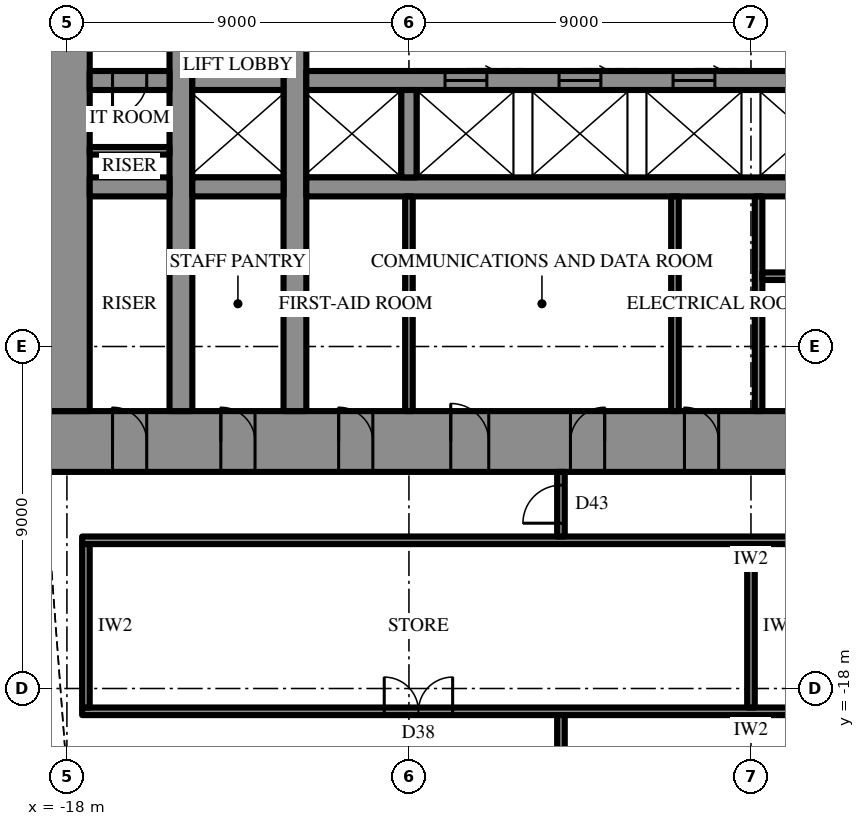
"""IFC4 building model, lengths in metres.
Left out: names, types, materials, properties, quantities, classifications, styles, units other than length and angle.
Written with IfcOpenShell. Run it as: python <this file> out.ifc"""

import sys

from ifc_helpers import new_model, si_unit, direction, frame, frame_2d, origin, place, context, subcontext, project, spatial, rectangle, extrude, element, fill, save


model = new_model("IFC4")
c1 = context("Model", 3, precision=1e-05, world=origin(), true_north=direction((0.0, 1.0)))
c2 = subcontext(c1, "Body", "Model", "MODEL_VIEW")
j1 = project(units=[si_unit("LENGTHUNIT", "METRE"), si_unit("PLANEANGLEUNIT", "RADIAN")], contexts=[c1])
p1 = place(None, origin())
s1 = spatial("IfcSite", under=j1, at=p1, CompositionType="ELEMENT")
p2 = place(p1, origin())
s2 = spatial("IfcBuilding", under=s1, at=p2, CompositionType="ELEMENT")
p3 = place(p2, frame((0.0, 0.0, 178.3)))
s3 = spatial("IfcBuildingStorey", under=s2, at=p3, CompositionType="ELEMENT", Elevation=178.3)
p4 = place(p3, frame((18.6, -11.5, 0.0), z_axis=(0.0, 0.0, 1.0), x_axis=(-1.0, 0.0, 0.0)))
e1 = element("IfcWall", 1, at=p4, inside=s3, PredefinedType="SHEAR", context=c2, shape_type="SweptSolid", body=[
    extrude(rectangle(XDim=37.2, YDim=1.6, at=frame_2d((18.6, 0.0))), origin(), (0.0, 0.0, 1.0), 4.2),
])
p5 = place(p4, frame((19.45, 0.0, 0.0)))
e2 = element("IfcOpeningElement", 2, at=p5, cuts=e1, PredefinedType="OPENING", context=c2, shape_type="SweptSolid", body=[
    extrude(rectangle(XDim=0.9, YDim=2.2, at=frame_2d((0.45, 1.1))), frame((0.0, 0.81, 0.0), z_axis=(0.0, -1.0, 0.0), x_axis=(1.0, 0.0, 0.0)), (0.0, 0.0, 1.0), 1.62),
])
p6 = place(p4, frame((22.45, 0.0, 0.0)))
e3 = element("IfcOpeningElement", 3, at=p6, cuts=e1, PredefinedType="OPENING", context=c2, shape_type="SweptSolid", body=[
    extrude(rectangle(XDim=0.9, YDim=2.2, at=frame_2d((0.45, 1.1))), frame((0.0, 0.81, 0.0), z_axis=(0.0, -1.0, 0.0), x_axis=(1.0, 0.0, 0.0)), (0.0, 0.0, 1.0), 1.62),
])
p7 = place(p4, frame((25.5, 0.0, 0.0)))
e4 = element("IfcOpeningElement", 4, at=p7, cuts=e1, PredefinedType="OPENING", context=c2, shape_type="SweptSolid", body=[
    extrude(rectangle(XDim=1.0, YDim=2.2, at=frame_2d((0.5, 1.1))), frame((0.0, 0.81, 0.0), z_axis=(0.0, -1.0, 0.0), x_axis=(1.0, 0.0, 0.0)), (0.0, 0.0, 1.0), 1.62),
])
p8 = place(p4, frame((1.8, 0.0, 0.0)))
e5 = element("IfcOpeningElement", 5, at=p8, cuts=e1, PredefinedType="OPENING", context=c2, shape_type="SweptSolid", body=[
    extrude(rectangle(XDim=0.9, YDim=2.2, at=frame_2d((0.45, 1.1))), frame((0.0, 0.81, 0.0), z_axis=(0.0, -1.0, 0.0), x_axis=(1.0, 0.0, 0.0)), (0.0, 0.0, 1.0), 1.62),
])
p9 = place(p4, frame((4.65, 0.0, 0.0)))
e6 = element("IfcOpeningElement", 6, at=p9, cuts=e1, PredefinedType="OPENING", context=c2, shape_type="SweptSolid", body=[
    extrude(rectangle(XDim=0.9, YDim=2.2, at=frame_2d((0.45, 1.1))), frame((0.0, 0.81, 0.0), z_axis=(0.0, -1.0, 0.0), x_axis=(1.0, 0.0, 0.0)), (0.0, 0.0, 1.0), 1.62),
])
p10 = place(p4, frame((7.75, 0.0, 0.0)))
e7 = element("IfcOpeningElement", 7, at=p10, cuts=e1, PredefinedType="OPENING", context=c2, shape_type="SweptSolid", body=[
    extrude(rectangle(XDim=0.9, YDim=2.2, at=frame_2d((0.45, 1.1))), frame((0.0, 0.81, 0.0), z_axis=(0.0, -1.0, 0.0), x_axis=(1.0, 0.0, 0.0)), (0.0, 0.0, 1.0), 1.62),
])
p11 = place(p4, frame((28.55, 0.0, 0.0)))
e8 = element("IfcOpeningElement", 8, at=p11, cuts=e1, PredefinedType="OPENING", context=c2, shape_type="SweptSolid", body=[
    extrude(rectangle(XDim=0.9, YDim=2.2, at=frame_2d((0.45, 1.1))), frame((0.0, 0.81, 0.0), z_axis=(0.0, -1.0, 0.0), x_axis=(1.0, 0.0, 0.0)), (0.0, 0.0, 1.0), 1.62),
])
p12 = place(p4, frame((31.65, 0.0, 0.0)))
e9 = element("IfcOpeningElement", 9, at=p12, cuts=e1, PredefinedType="OPENING", context=c2, shape_type="SweptSolid", body=[
    extrude(rectangle(XDim=0.9, YDim=2.2, at=frame_2d((0.45, 1.1))), frame((0.0, 0.81, 0.0), z_axis=(0.0, -1.0, 0.0), x_axis=(1.0, 0.0, 0.0)), (0.0, 0.0, 1.0), 1.62),
])
p13 = place(p4, frame((34.5, 0.0, 0.0)))
e10 = element("IfcOpeningElement", 10, at=p13, cuts=e1, PredefinedType="OPENING", context=c2, shape_type="SweptSolid", body=[
    extrude(rectangle(XDim=0.9, YDim=2.2, at=frame_2d((0.45, 1.1))), frame((0.0, 0.81, 0.0), z_axis=(0.0, -1.0, 0.0), x_axis=(1.0, 0.0, 0.0)), (0.0, 0.0, 1.0), 1.62),
])
p14 = place(p3, frame((-18.0, 10.7, 0.0), z_axis=(0.0, 0.0, 1.0), x_axis=(0.0, -1.0, 0.0)))
e11 = element("IfcWall", 11, at=p14, inside=s3, PredefinedType="SHEAR", context=c2, shape_type="SweptSolid", body=[
    extrude(rectangle(XDim=21.4, YDim=1.2, at=frame_2d((10.7, 0.0))), origin(), (0.0, 0.0, 1.0), 4.2),
])
p15 = place(p14, frame((9.8, 0.0, 0.0)))
e12 = element("IfcOpeningElement", 12, at=p15, cuts=e11, PredefinedType="OPENING", context=c2, shape_type="SweptSolid", body=[
    extrude(rectangle(XDim=1.8, YDim=2.4, at=frame_2d((0.9, 1.2))), frame((0.0, 0.61, 0.0), z_axis=(0.0, -1.0, 0.0), x_axis=(1.0, 0.0, 0.0)), (0.0, 0.0, 1.0), 1.22),
])
p16 = place(p3, frame((-12.0, -10.7, 0.0), z_axis=(0.0, 0.0, 1.0), x_axis=(0.0, 1.0, 0.0)))
e13 = element("IfcWall", 13, at=p16, inside=s3, PredefinedType="SHEAR", context=c2, shape_type="SweptSolid", body=[
    extrude(rectangle(XDim=21.4, YDim=0.6, at=frame_2d((10.7, 0.0))), origin(), (0.0, 0.0, 1.0), 4.2),
])
p17 = place(p16, frame((9.8, 0.0, 0.0)))
e14 = element("IfcOpeningElement", 14, at=p17, cuts=e13, PredefinedType="OPENING", context=c2, shape_type="SweptSolid", body=[
    extrude(rectangle(XDim=1.8, YDim=2.4, at=frame_2d((0.9, 1.2))), frame((0.0, 0.31, 0.0), z_axis=(0.0, -1.0, 0.0), x_axis=(1.0, 0.0, 0.0)), (0.0, 0.0, 1.0), 0.62),
])
p18 = place(p3, frame((-15.0, -10.7, 0.0), z_axis=(0.0, 0.0, 1.0), x_axis=(0.0, 1.0, 0.0)))
e15 = element("IfcWall", 15, at=p18, inside=s3, PredefinedType="SHEAR", context=c2, shape_type="SweptSolid", body=[
    extrude(rectangle(XDim=21.4, YDim=0.6, at=frame_2d((10.7, 0.0))), origin(), (0.0, 0.0, 1.0), 4.2),
])
p19 = place(p18, frame((9.8, 0.0, 0.0)))
e16 = element("IfcOpeningElement", 16, at=p19, cuts=e15, PredefinedType="OPENING", context=c2, shape_type="SweptSolid", body=[
    extrude(rectangle(XDim=1.8, YDim=2.4, at=frame_2d((0.9, 1.2))), frame((0.0, 0.31, 0.0), z_axis=(0.0, -1.0, 0.0), x_axis=(1.0, 0.0, 0.0)), (0.0, 0.0, 1.0), 0.62),
])
p20 = place(p3, frame((3.2, -2.0, 0.0), z_axis=(0.0, 0.0, 1.0), x_axis=(-1.0, 0.0, 0.0)))
e17 = element("IfcWall", 17, at=p20, inside=s3, PredefinedType="SHEAR", context=c2, shape_type="SweptSolid", body=[
    extrude(rectangle(XDim=14.9, YDim=0.5, at=frame_2d((7.45, 0.0))), origin(), (0.0, 0.0, 1.0), 4.2),
])
p21 = place(p20, frame((1.15, 0.0, 0.0)))
e18 = element("IfcOpeningElement", 18, at=p21, cuts=e17, PredefinedType="OPENING", context=c2, shape_type="SweptSolid", body=[
    extrude(rectangle(XDim=1.1, YDim=2.2, at=frame_2d((0.55, 1.1))), frame((0.0, 0.26, 0.0), z_axis=(0.0, -1.0, 0.0), x_axis=(1.0, 0.0, 0.0)), (0.0, 0.0, 1.0), 0.52),
])
p22 = place(p20, frame((4.15, 0.0, 0.0)))
e19 = element("IfcOpeningElement", 19, at=p22, cuts=e17, PredefinedType="OPENING", context=c2, shape_type="SweptSolid", body=[
    extrude(rectangle(XDim=1.1, YDim=2.2, at=frame_2d((0.55, 1.1))), frame((0.0, 0.26, 0.0), z_axis=(0.0, -1.0, 0.0), x_axis=(1.0, 0.0, 0.0)), (0.0, 0.0, 1.0), 0.52),
])
p23 = place(p20, frame((7.15, 0.0, 0.0)))
e20 = element("IfcOpeningElement", 20, at=p23, cuts=e17, PredefinedType="OPENING", context=c2, shape_type="SweptSolid", body=[
    extrude(rectangle(XDim=1.1, YDim=2.2, at=frame_2d((0.55, 1.1))), frame((0.0, 0.26, 0.0), z_axis=(0.0, -1.0, 0.0), x_axis=(1.0, 0.0, 0.0)), (0.0, 0.0, 1.0), 0.52),
])
p24 = place(p20, frame((10.15, 0.0, 0.0)))
e21 = element("IfcOpeningElement", 21, at=p24, cuts=e17, PredefinedType="OPENING", context=c2, shape_type="SweptSolid", body=[
    extrude(rectangle(XDim=1.1, YDim=2.2, at=frame_2d((0.55, 1.1))), frame((0.0, 0.26, 0.0), z_axis=(0.0, -1.0, 0.0), x_axis=(1.0, 0.0, 0.0)), (0.0, 0.0, 1.0), 0.52),
])
p25 = place(p3, frame((-12.3, -2.0, 0.0), z_axis=(0.0, 0.0, 1.0), x_axis=(-1.0, 0.0, 0.0)))
e22 = element("IfcWall", 22, at=p25, inside=s3, PredefinedType="SHEAR", context=c2, shape_type="SweptSolid", body=[
    extrude(rectangle(XDim=2.4, YDim=0.5, at=frame_2d((1.2, 0.0))), origin(), (0.0, 0.0, 1.0), 4.2),
])
p26 = place(p3, frame((-15.3, -2.0, 0.0), z_axis=(0.0, 0.0, 1.0), x_axis=(-1.0, 0.0, 0.0)))
e23 = element("IfcWall", 23, at=p26, inside=s3, PredefinedType="SHEAR", context=c2, shape_type="SweptSolid", body=[
    extrude(rectangle(XDim=2.1, YDim=0.5, at=frame_2d((1.05, 0.0))), origin(), (0.0, 0.0, 1.0), 4.2),
])
p27 = place(p26, frame((0.6, 0.0, 0.0)))
e24 = element("IfcOpeningElement", 24, at=p27, cuts=e23, PredefinedType="OPENING", context=c2, shape_type="SweptSolid", body=[
    extrude(rectangle(XDim=0.9, YDim=2.2, at=frame_2d((0.45, 1.1))), frame((0.0, 0.26, 0.0), z_axis=(0.0, -1.0, 0.0), x_axis=(1.0, 0.0, 0.0)), (0.0, 0.0, 1.0), 0.52),
])
p28 = place(p3, frame((11.7, -4.8, 0.0), z_axis=(0.0, 0.0, 1.0), x_axis=(-1.0, 0.0, 0.0)))
e25 = element("IfcWall", 25, at=p28, inside=s3, PredefinedType="SHEAR", context=c2, shape_type="SweptSolid", body=[
    extrude(rectangle(XDim=23.4, YDim=0.5, at=frame_2d((11.7, 0.0))), origin(), (0.0, 0.0, 1.0), 4.2),
])
p29 = place(p28, frame((6.6, 0.0, 0.0)))
e26 = element("IfcOpeningElement", 26, at=p29, cuts=e25, PredefinedType="OPENING", context=c2, shape_type="SweptSolid", body=[
    extrude(rectangle(XDim=1.2, YDim=2.2, at=frame_2d((0.6, 1.1))), frame((0.0, 0.26, 0.0), z_axis=(0.0, -1.0, 0.0), x_axis=(1.0, 0.0, 0.0)), (0.0, 0.0, 1.0), 0.52),
])
p30 = place(p28, frame((3.6, 0.0, 0.0)))
e27 = element("IfcOpeningElement", 27, at=p30, cuts=e25, PredefinedType="OPENING", context=c2, shape_type="SweptSolid", body=[
    extrude(rectangle(XDim=1.2, YDim=2.2, at=frame_2d((0.6, 1.1))), frame((0.0, 0.26, 0.0), z_axis=(0.0, -1.0, 0.0), x_axis=(1.0, 0.0, 0.0)), (0.0, 0.0, 1.0), 0.52),
])
p31 = place(p3, frame((-12.3, -4.8, 0.0), z_axis=(0.0, 0.0, 1.0), x_axis=(-1.0, 0.0, 0.0)))
e28 = element("IfcWall", 28, at=p31, inside=s3, PredefinedType="SHEAR", context=c2, shape_type="SweptSolid", body=[
    extrude(rectangle(XDim=2.4, YDim=0.5, at=frame_2d((1.2, 0.0))), origin(), (0.0, 0.0, 1.0), 4.2),
])
p32 = place(p3, frame((-15.3, -4.8, 0.0), z_axis=(0.0, 0.0, 1.0), x_axis=(-1.0, 0.0, 0.0)))
e29 = element("IfcWall", 29, at=p32, inside=s3, PredefinedType="SHEAR", context=c2, shape_type="SweptSolid", body=[
    extrude(rectangle(XDim=2.1, YDim=0.5, at=frame_2d((1.05, 0.0))), origin(), (0.0, 0.0, 1.0), 4.2),
])
p33 = place(p3, frame((-9.0, -2.25, 0.0), z_axis=(0.0, 0.0, 1.0), x_axis=(0.0, -1.0, 0.0)))
e30 = element("IfcWall", 30, at=p33, inside=s3, PredefinedType="SHEAR", context=c2, shape_type="SweptSolid", body=[
    extrude(rectangle(XDim=2.3, YDim=0.4, at=frame_2d((1.15, 0.0))), origin(), (0.0, 0.0, 1.0), 4.2),
])
p34 = place(p3, frame((0.2, -5.05, 0.0), z_axis=(0.0, 0.0, 1.0), x_axis=(0.0, -1.0, 0.0)))
e31 = element("IfcWall", 31, at=p34, inside=s3, PredefinedType="SHEAR", context=c2, shape_type="SweptSolid", body=[
    extrude(rectangle(XDim=5.65, YDim=0.2, at=frame_2d((2.825, 0.0))), origin(), (0.0, 0.0, 1.0), 4.2),
])
p35 = place(p3, frame((8.9, -7.15, 0.0), z_axis=(0.0, 0.0, 1.0), x_axis=(-1.0, 0.0, 0.0)))
e32 = element("IfcWall", 32, at=p35, inside=s3, PredefinedType="SHEAR", context=c2, shape_type="SweptSolid", body=[
    extrude(rectangle(XDim=8.6, YDim=0.2, at=frame_2d((4.3, 0.0))), origin(), (0.0, 0.0, 1.0), 4.2),
])
p36 = place(p35, frame((0.3, 0.0, 0.0)))
e33 = element("IfcOpeningElement", 33, at=p36, cuts=e32, PredefinedType="OPENING", context=c2, shape_type="SweptSolid", body=[
    extrude(rectangle(XDim=1.0, YDim=2.2, at=frame_2d((0.5, 1.1))), frame((0.0, 0.11, 0.0), z_axis=(0.0, -1.0, 0.0), x_axis=(1.0, 0.0, 0.0)), (0.0, 0.0, 1.0), 0.22),
])
for number, where, z_axis, x_axis in (
    (34, (-9.0, -5.05, 0.0), (0.0, 0.0, 1.0), (0.0, -1.0, 0.0)),
    (35, (-2.0, -5.05, 0.0), (0.0, 0.0, 1.0), (0.0, -1.0, 0.0)),
):
    element("IfcWall", number, at=place(p3, frame(where, z_axis=z_axis, x_axis=x_axis)), inside=s3, PredefinedType="PARTITIONING", context=c2, shape_type="SweptSolid", body=[
        extrude(rectangle(XDim=5.65, YDim=0.2, at=frame_2d((2.825, 0.0))), origin(), (0.0, 0.0, 1.0), 4.0),
    ])
p37 = place(p3, frame((-15.3, -3.85, 0.0), z_axis=(0.0, 0.0, 1.0), x_axis=(-1.0, 0.0, 0.0)))
e36 = element("IfcWall", 36, at=p37, inside=s3, PredefinedType="PARTITIONING", context=c2, shape_type="SweptSolid", body=[
    extrude(rectangle(XDim=2.1, YDim=0.2, at=frame_2d((1.05, 0.0))), origin(), (0.0, 0.0, 1.0), 4.0),
])
p38 = place(p3, frame((17.6, -14.1, 0.0), z_axis=(0.0, 0.0, 1.0), x_axis=(-1.0, 0.0, 0.0)))
e37 = element("IfcWall", 37, at=p38, inside=s3, PredefinedType="PARTITIONING", context=c2, shape_type="SweptSolid", body=[
    extrude(rectangle(XDim=35.2, YDim=0.2, at=frame_2d((17.6, 0.0))), origin(), (0.0, 0.0, 1.0), 4.0),
])
p39 = place(p3, frame((17.6, -18.6, 0.0), z_axis=(0.0, 0.0, 1.0), x_axis=(-1.0, 0.0, 0.0)))
e38 = element("IfcWall", 38, at=p39, inside=s3, PredefinedType="PARTITIONING", context=c2, shape_type="SweptSolid", body=[
    extrude(rectangle(XDim=35.2, YDim=0.2, at=frame_2d((17.6, 0.0))), origin(), (0.0, 0.0, 1.0), 4.0),
])
p40 = place(p39, frame((7.95, 0.0, 0.0)))
e39 = element("IfcOpeningElement", 39, at=p40, cuts=e38, PredefinedType="OPENING", context=c2, shape_type="SweptSolid", body=[
    extrude(rectangle(XDim=1.8, YDim=2.4, at=frame_2d((0.9, 1.2))), frame((0.0, 0.11, 0.0), z_axis=(0.0, -1.0, 0.0), x_axis=(1.0, 0.0, 0.0)), (0.0, 0.0, 1.0), 0.22),
])
p41 = place(p39, frame((25.45, 0.0, 0.0)))
e40 = element("IfcOpeningElement", 40, at=p41, cuts=e38, PredefinedType="OPENING", context=c2, shape_type="SweptSolid", body=[
    extrude(rectangle(XDim=1.8, YDim=2.4, at=frame_2d((0.9, 1.2))), frame((0.0, 0.11, 0.0), z_axis=(0.0, -1.0, 0.0), x_axis=(1.0, 0.0, 0.0)), (0.0, 0.0, 1.0), 0.22),
])
p42 = place(p3, frame((0.0, -14.2, 0.0), z_axis=(0.0, 0.0, 1.0), x_axis=(0.0, -1.0, 0.0)))
e41 = element("IfcWall", 41, at=p42, inside=s3, PredefinedType="PARTITIONING", context=c2, shape_type="SweptSolid", body=[
    extrude(rectangle(XDim=4.3, YDim=0.2, at=frame_2d((2.15, 0.0))), origin(), (0.0, 0.0, 1.0), 2.992),
])
p43 = place(p3, frame((-17.5, -14.2, 0.0), z_axis=(0.0, 0.0, 1.0), x_axis=(0.0, -1.0, 0.0)))
e42 = element("IfcWall", 42, at=p43, inside=s3, PredefinedType="PARTITIONING", context=c2, shape_type="SweptSolid", body=[
    extrude(rectangle(XDim=4.3, YDim=0.2, at=frame_2d((2.15, 0.0))), origin(), (0.0, 0.0, 1.0), 4.0),
])
p44 = place(p3, frame((-5.0, -12.3, 0.0), z_axis=(0.0, 0.0, 1.0), x_axis=(0.0, -1.0, 0.0)))
e43 = element("IfcWall", 43, at=p44, inside=s3, PredefinedType="PARTITIONING", context=c2, shape_type="SweptSolid", body=[
    extrude(rectangle(XDim=1.7, YDim=0.2, at=frame_2d((0.85, 0.0))), origin(), (0.0, 0.0, 1.0), 2.992),
])
p45 = place(p44, frame((0.35, 0.0, 0.0)))
e44 = element("IfcOpeningElement", 44, at=p45, cuts=e43, PredefinedType="OPENING", context=c2, shape_type="SweptSolid", body=[
    extrude(rectangle(XDim=1.0, YDim=2.2, at=frame_2d((0.5, 1.1))), frame((0.0, 0.11, 0.0), z_axis=(0.0, -1.0, 0.0), x_axis=(1.0, 0.0, 0.0)), (0.0, 0.0, 1.0), 0.22),
])
p46 = place(p3, frame((-5.0, -18.7, 0.0), z_axis=(0.0, 0.0, 1.0), x_axis=(0.0, -1.0, 0.0)))
e45 = element("IfcWall", 45, at=p46, inside=s3, PredefinedType="PARTITIONING", context=c2, shape_type="SweptSolid", body=[
    extrude(rectangle(XDim=6.2, YDim=0.2, at=frame_2d((3.1, 0.0))), origin(), (0.0, 0.0, 1.0), 2.992),
])
p47 = place(p5, frame((0.9, 0.0, 0.0), z_axis=(0.0, 0.0, 1.0), x_axis=(-1.0, 0.0, 0.0)))
e46 = element("IfcDoor", 46, at=p47, inside=s3, OperationType="SINGLE_SWING_RIGHT", PredefinedType="DOOR", context=c2, shape_type="SweptSolid", body=[
    extrude(rectangle(XDim=0.9, YDim=2.2, at=frame_2d((0.45, 1.1))), frame((0.0, 0.025, 0.0), z_axis=(0.0, -1.0, 0.0), x_axis=(1.0, 0.0, 0.0)), (0.0, 0.0, 1.0), 0.05),
])
fill(e2, e46)
p48 = place(p6, frame((0.9, 0.0, 0.0), z_axis=(0.0, 0.0, 1.0), x_axis=(-1.0, 0.0, 0.0)))
e47 = element("IfcDoor", 47, at=p48, inside=s3, OperationType="SINGLE_SWING_LEFT", PredefinedType="DOOR", context=c2, shape_type="SweptSolid", body=[
    extrude(rectangle(XDim=0.9, YDim=2.2, at=frame_2d((0.45, 1.1))), frame((0.0, 0.025, 0.0), z_axis=(0.0, -1.0, 0.0), x_axis=(1.0, 0.0, 0.0)), (0.0, 0.0, 1.0), 0.05),
])
fill(e3, e47)
p49 = place(p7, frame((1.0, 0.0, 0.0), z_axis=(0.0, 0.0, 1.0), x_axis=(-1.0, 0.0, 0.0)))
e48 = element("IfcDoor", 48, at=p49, inside=s3, OperationType="SINGLE_SWING_RIGHT", PredefinedType="DOOR", context=c2, shape_type="SweptSolid", body=[
    extrude(rectangle(XDim=1.0, YDim=2.2, at=frame_2d((0.5, 1.1))), frame((0.0, 0.025, 0.0), z_axis=(0.0, -1.0, 0.0), x_axis=(1.0, 0.0, 0.0)), (0.0, 0.0, 1.0), 0.05),
])
fill(e4, e48)
p50 = place(p11, frame((0.9, 0.0, 0.0), z_axis=(0.0, 0.0, 1.0), x_axis=(-1.0, 0.0, 0.0)))
e49 = element("IfcDoor", 49, at=p50, inside=s3, OperationType="SINGLE_SWING_RIGHT", PredefinedType="DOOR", context=c2, shape_type="SweptSolid", body=[
    extrude(rectangle(XDim=0.9, YDim=2.2, at=frame_2d((0.45, 1.1))), frame((0.0, 0.025, 0.0), z_axis=(0.0, -1.0, 0.0), x_axis=(1.0, 0.0, 0.0)), (0.0, 0.0, 1.0), 0.05),
])
fill(e8, e49)
p51 = place(p12, frame((0.9, 0.0, 0.0), z_axis=(0.0, 0.0, 1.0), x_axis=(-1.0, 0.0, 0.0)))
e50 = element("IfcDoor", 50, at=p51, inside=s3, OperationType="SINGLE_SWING_RIGHT", PredefinedType="DOOR", context=c2, shape_type="SweptSolid", body=[
    extrude(rectangle(XDim=0.9, YDim=2.2, at=frame_2d((0.45, 1.1))), frame((0.0, 0.025, 0.0), z_axis=(0.0, -1.0, 0.0), x_axis=(1.0, 0.0, 0.0)), (0.0, 0.0, 1.0), 0.05),
])
fill(e9, e50)
p52 = place(p13, frame((0.9, 0.0, 0.0), z_axis=(0.0, 0.0, 1.0), x_axis=(-1.0, 0.0, 0.0)))
e51 = element("IfcDoor", 51, at=p52, inside=s3, OperationType="SINGLE_SWING_RIGHT", PredefinedType="DOOR", context=c2, shape_type="SweptSolid", body=[
    extrude(rectangle(XDim=0.9, YDim=2.2, at=frame_2d((0.45, 1.1))), frame((0.0, 0.025, 0.0), z_axis=(0.0, -1.0, 0.0), x_axis=(1.0, 0.0, 0.0)), (0.0, 0.0, 1.0), 0.05),
])
fill(e10, e51)
p53 = place(p27, origin())
e52 = element("IfcDoor", 52, at=p53, inside=s3, OperationType="SINGLE_SWING_LEFT", PredefinedType="DOOR", context=c2, shape_type="SweptSolid", body=[
    extrude(rectangle(XDim=0.9, YDim=2.2, at=frame_2d((0.45, 1.1))), frame((0.0, 0.025, 0.0), z_axis=(0.0, -1.0, 0.0), x_axis=(1.0, 0.0, 0.0)), (0.0, 0.0, 1.0), 0.05),
])
fill(e24, e52)
p54 = place(p22, frame((1.1, 0.0, 0.0), z_axis=(0.0, 0.0, 1.0), x_axis=(-1.0, 0.0, 0.0)))
e53 = element("IfcDoor", 53, at=p54, inside=s3, OperationType="SLIDING_TO_LEFT", PredefinedType="DOOR", context=c2, shape_type="SweptSolid", body=[
    extrude(rectangle(XDim=1.1, YDim=2.2, at=frame_2d((0.55, 1.1))), frame((0.0, 0.025, 0.0), z_axis=(0.0, -1.0, 0.0), x_axis=(1.0, 0.0, 0.0)), (0.0, 0.0, 1.0), 0.05),
])
fill(e19, e53)
p55 = place(p23, frame((1.1, 0.0, 0.0), z_axis=(0.0, 0.0, 1.0), x_axis=(-1.0, 0.0, 0.0)))
e54 = element("IfcDoor", 54, at=p55, inside=s3, OperationType="SLIDING_TO_LEFT", PredefinedType="DOOR", context=c2, shape_type="SweptSolid", body=[
    extrude(rectangle(XDim=1.1, YDim=2.2, at=frame_2d((0.55, 1.1))), frame((0.0, 0.025, 0.0), z_axis=(0.0, -1.0, 0.0), x_axis=(1.0, 0.0, 0.0)), (0.0, 0.0, 1.0), 0.05),
])
fill(e20, e54)
p56 = place(p24, frame((1.1, 0.0, 0.0), z_axis=(0.0, 0.0, 1.0), x_axis=(-1.0, 0.0, 0.0)))
e55 = element("IfcDoor", 55, at=p56, inside=s3, OperationType="SLIDING_TO_LEFT", PredefinedType="DOOR", context=c2, shape_type="SweptSolid", body=[
    extrude(rectangle(XDim=1.1, YDim=2.2, at=frame_2d((0.55, 1.1))), frame((0.0, 0.025, 0.0), z_axis=(0.0, -1.0, 0.0), x_axis=(1.0, 0.0, 0.0)), (0.0, 0.0, 1.0), 0.05),
])
fill(e21, e55)
p57 = place(p41, frame((1.8, 0.0, 0.0), z_axis=(0.0, 0.0, 1.0), x_axis=(-1.0, 0.0, 0.0)))
e56 = element("IfcDoor", 56, at=p57, inside=s3, OperationType="DOUBLE_DOOR_SINGLE_SWING", PredefinedType="DOOR", context=c2, shape_type="SweptSolid", body=[
    extrude(rectangle(XDim=1.8, YDim=2.4, at=frame_2d((0.9, 1.2))), frame((0.0, 0.025, 0.0), z_axis=(0.0, -1.0, 0.0), x_axis=(1.0, 0.0, 0.0)), (0.0, 0.0, 1.0), 0.05),
])
fill(e40, e56)
p58 = place(p45, frame((1.0, 0.0, 0.0), z_axis=(0.0, 0.0, 1.0), x_axis=(-1.0, 0.0, 0.0)))
e57 = element("IfcDoor", 57, at=p58, inside=s3, OperationType="SINGLE_SWING_RIGHT", PredefinedType="DOOR", context=c2, shape_type="SweptSolid", body=[
    extrude(rectangle(XDim=1.0, YDim=2.2, at=frame_2d((0.5, 1.1))), frame((0.0, 0.025, 0.0), z_axis=(0.0, -1.0, 0.0), x_axis=(1.0, 0.0, 0.0)), (0.0, 0.0, 1.0), 0.05),
])
fill(e44, e57)
save(model, sys.argv[1])
